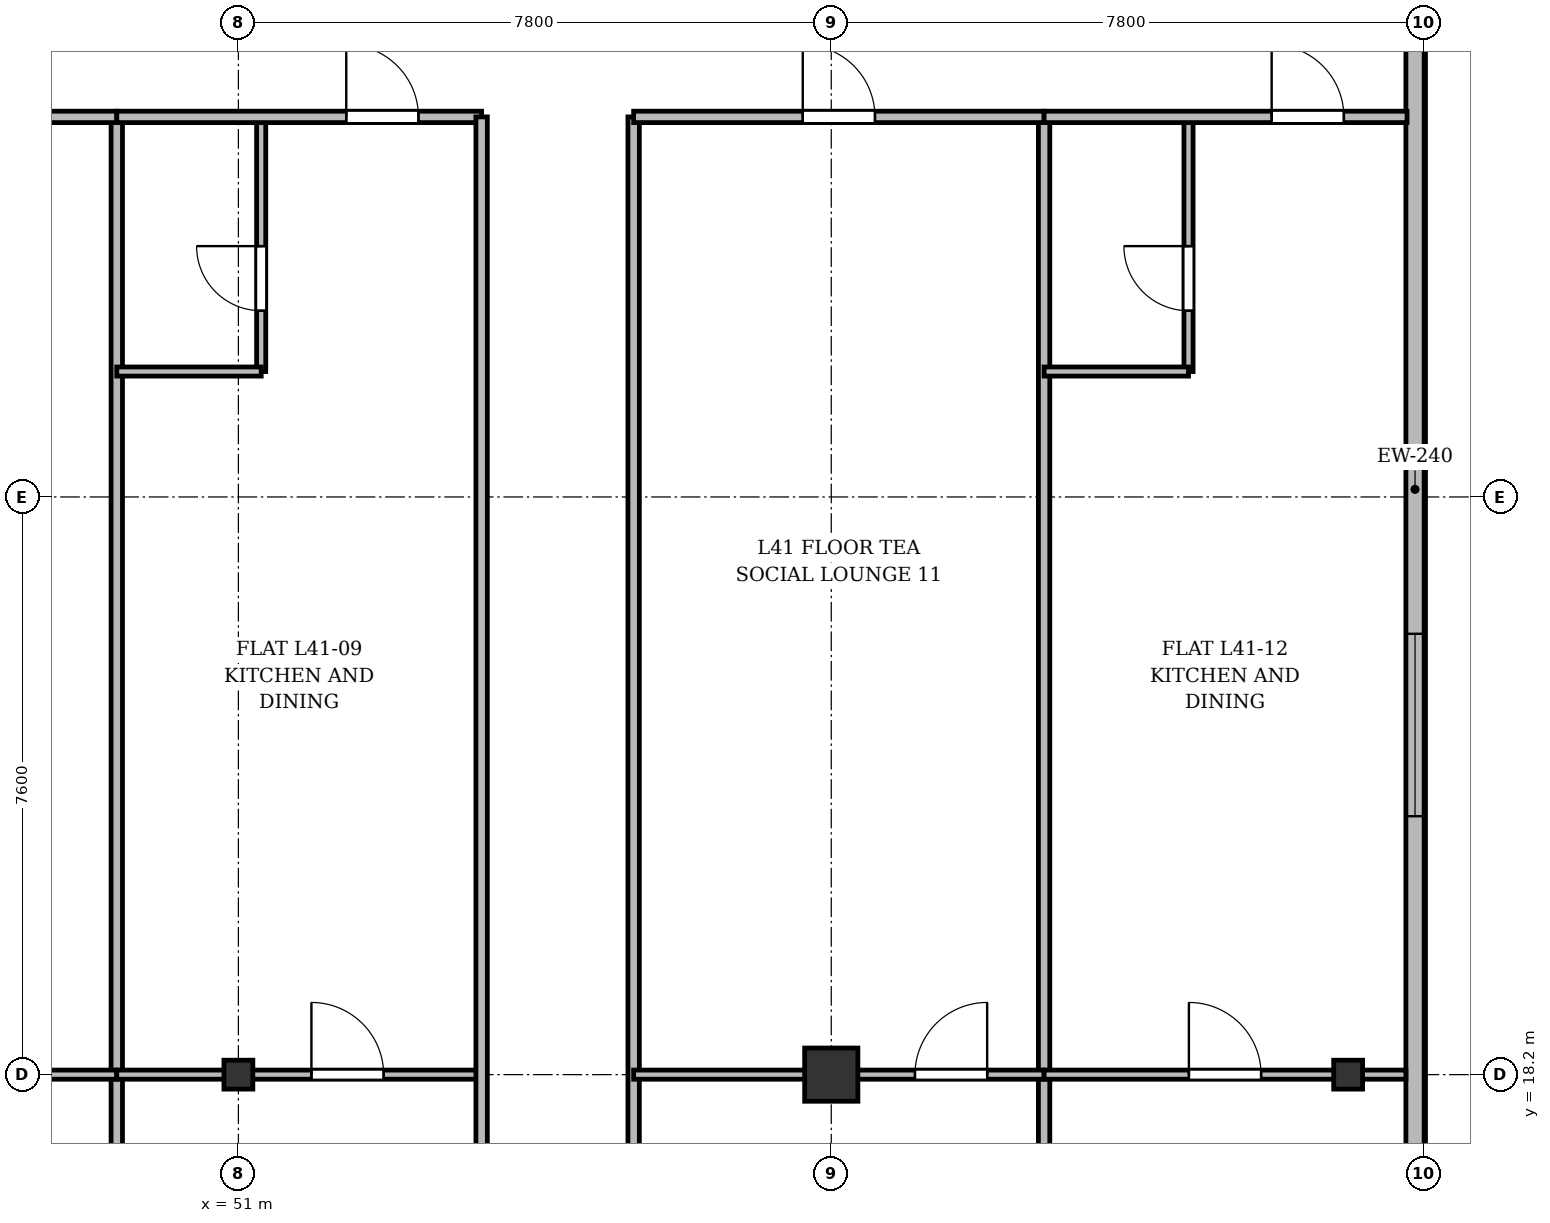
"""IFC4 building model, lengths in metres.
Left out: names, types, materials, properties, quantities, classifications, styles, units other than length and angle.
Written with IfcOpenShell. Run it as: python <this file> out.ifc"""

import sys

from ifc_helpers import new_model, si_unit, direction, frame, frame_2d, origin, origin_2d, place, context, subcontext, project, spatial, rectangle, i_section, extrude, source, transform, mapped, element, fill, save


model = new_model("IFC4")
c1 = context("Model", 3, precision=1e-05, world=origin(), true_north=direction((0.0, 1.0)))
c2 = subcontext(c1, "Body", "Model", "MODEL_VIEW")
j1 = project(units=[si_unit("LENGTHUNIT", "METRE"), si_unit("PLANEANGLEUNIT", "RADIAN")], contexts=[c1])
p1 = place(None, origin())
s1 = spatial("IfcSite", under=j1, at=p1, CompositionType="ELEMENT")
p2 = place(p1, origin())
s2 = spatial("IfcBuilding", under=s1, at=p2, CompositionType="ELEMENT")
p3 = place(p2, frame((0.0, 0.0, 157.3)))
s3 = spatial("IfcBuildingStorey", under=s2, at=p3, CompositionType="ELEMENT", Elevation=157.3)
m1 = source(origin(), c2, "Body", "SweptSolid", [
    extrude(i_section(OverallWidth=0.38, OverallDepth=0.38, WebThickness=0.02, FlangeThickness=0.03, at=origin_2d()), origin(), (0.0, 0.0, 1.0), 3.6),
])
p4 = place(p3, frame((51.0, 18.2, 0.0), z_axis=(0.0, 0.0, 1.0), x_axis=(1.0, 0.0, 0.0)))
e1 = element("IfcColumn", 1, at=p4, inside=s3, PredefinedType="COLUMN", context=c2, shape_type="MappedRepresentation", body=[
    mapped(m1, transform((0.0, 0.0, 0.0), x_axis=(1.0, 0.0, 0.0), y_axis=(0.0, 1.0, 0.0), z_axis=(0.0, 0.0, 1.0), scale=1.0)),
])
m2 = source(origin(), c2, "Body", "SweptSolid", [
    extrude(rectangle(XDim=0.7, YDim=0.7, at=origin_2d()), origin(), (0.0, 0.0, 1.0), 3.6),
])
p5 = place(p3, frame((58.8, 18.2, 0.0), z_axis=(0.0, 0.0, 1.0), x_axis=(1.0, 0.0, 0.0)))
e2 = element("IfcColumn", 2, at=p5, inside=s3, PredefinedType="COLUMN", context=c2, shape_type="MappedRepresentation", body=[
    mapped(m2, transform((0.0, 0.0, 0.0), x_axis=(1.0, 0.0, 0.0), y_axis=(0.0, 1.0, 0.0), z_axis=(0.0, 0.0, 1.0), scale=1.0)),
])
p6 = place(p3, frame((65.6, 18.2, 0.0), z_axis=(0.0, 0.0, 1.0), x_axis=(1.0, 0.0, 0.0)))
e3 = element("IfcColumn", 3, at=p6, inside=s3, PredefinedType="COLUMN", context=c2, shape_type="MappedRepresentation", body=[
    mapped(m1, transform((0.0, 0.0, 0.0), x_axis=(1.0, 0.0, 0.0), y_axis=(0.0, 1.0, 0.0), z_axis=(0.0, 0.0, 1.0), scale=1.0)),
])
p7 = place(p3, frame((66.48, 45.5, 0.0), z_axis=(0.0, 0.0, 1.0), x_axis=(0.0, -1.0, 0.0)))
e4 = element("IfcWall", 4, at=p7, inside=s3, PredefinedType="SOLIDWALL", context=c2, shape_type="SweptSolid", body=[
    extrude(rectangle(XDim=39.2, YDim=0.24, at=frame_2d((19.6, 0.0))), origin(), (0.0, 0.0, 1.0), 3.35),
])
p8 = place(p7, frame((36.55, 0.0, 0.92)))
e5 = element("IfcOpeningElement", 5, at=p8, cuts=e4, PredefinedType="OPENING", context=c2, shape_type="SweptSolid", body=[
    extrude(rectangle(XDim=1.2, YDim=1.65, at=frame_2d((0.6, 0.825))), frame((0.0, 0.13, 0.0), z_axis=(0.0, -1.0, 0.0), x_axis=(1.0, 0.0, 0.0)), (0.0, 0.0, 1.0), 0.26),
])
p9 = place(p7, frame((32.9, 0.0, 0.92)))
e6 = element("IfcOpeningElement", 6, at=p9, cuts=e4, PredefinedType="OPENING", context=c2, shape_type="SweptSolid", body=[
    extrude(rectangle(XDim=2.4, YDim=2.1, at=frame_2d((1.2, 1.05))), frame((0.0, 0.13, 0.0), z_axis=(0.0, -1.0, 0.0), x_axis=(1.0, 0.0, 0.0)), (0.0, 0.0, 1.0), 0.26),
])
p10 = place(p7, frame((28.7, 0.0, 0.92)))
e7 = element("IfcOpeningElement", 7, at=p10, cuts=e4, PredefinedType="OPENING", context=c2, shape_type="SweptSolid", body=[
    extrude(rectangle(XDim=2.4, YDim=2.1, at=frame_2d((1.2, 1.05))), frame((0.0, 0.13, 0.0), z_axis=(0.0, -1.0, 0.0), x_axis=(1.0, 0.0, 0.0)), (0.0, 0.0, 1.0), 0.26),
])
p11 = place(p7, frame((21.5, 0.0, 0.92)))
e8 = element("IfcOpeningElement", 8, at=p11, cuts=e4, PredefinedType="OPENING", context=c2, shape_type="SweptSolid", body=[
    extrude(rectangle(XDim=2.4, YDim=2.1, at=frame_2d((1.2, 1.05))), frame((0.0, 0.13, 0.0), z_axis=(0.0, -1.0, 0.0), x_axis=(1.0, 0.0, 0.0)), (0.0, 0.0, 1.0), 0.26),
])
p12 = place(p7, frame((7.5, 0.0, 0.92)))
e9 = element("IfcOpeningElement", 9, at=p12, cuts=e4, PredefinedType="OPENING", context=c2, shape_type="SweptSolid", body=[
    extrude(rectangle(XDim=2.4, YDim=2.1, at=frame_2d((1.2, 1.05))), frame((0.0, 0.13, 0.0), z_axis=(0.0, -1.0, 0.0), x_axis=(1.0, 0.0, 0.0)), (0.0, 0.0, 1.0), 0.26),
])
p13 = place(p7, frame((4.5, 0.0, 0.92)))
e10 = element("IfcOpeningElement", 10, at=p13, cuts=e4, PredefinedType="OPENING", context=c2, shape_type="SweptSolid", body=[
    extrude(rectangle(XDim=1.2, YDim=1.65, at=frame_2d((0.6, 0.825))), frame((0.0, 0.13, 0.0), z_axis=(0.0, -1.0, 0.0), x_axis=(1.0, 0.0, 0.0)), (0.0, 0.0, 1.0), 0.26),
])
p14 = place(p7, frame((1.15, 0.0, 0.92)))
e11 = element("IfcOpeningElement", 11, at=p14, cuts=e4, PredefinedType="OPENING", context=c2, shape_type="SweptSolid", body=[
    extrude(rectangle(XDim=1.2, YDim=1.65, at=frame_2d((0.6, 0.825))), frame((0.0, 0.13, 0.0), z_axis=(0.0, -1.0, 0.0), x_axis=(1.0, 0.0, 0.0)), (0.0, 0.0, 1.0), 0.26),
])
for number, where, z_axis, x_axis in (
    (12, (49.4, 3.525, 0.0), (0.0, 0.0, 1.0), (0.0, 1.0, 0.0)),
    (13, (61.6, 3.525, 0.0), (0.0, 0.0, 1.0), (0.0, 1.0, 0.0)),
):
    element("IfcWall", number, at=place(p3, frame(where, z_axis=z_axis, x_axis=x_axis)), inside=s3, PredefinedType="PARTITIONING", context=c2, shape_type="SweptSolid", body=[
        extrude(rectangle(XDim=27.275, YDim=0.15, at=frame_2d((13.638, 0.0))), origin(), (0.0, 0.0, 1.0), 2.75),
    ])
p15 = place(p3, frame((43.8, 30.8, 0.0), z_axis=(0.0, 0.0, 1.0), x_axis=(1.0, 0.0, 0.0)))
e14 = element("IfcWall", 14, at=p15, inside=s3, PredefinedType="PARTITIONING", context=c2, shape_type="SweptSolid", body=[
    extrude(rectangle(XDim=5.6, YDim=0.15, at=frame_2d((2.8, 0.0))), origin(), (0.0, 0.0, 1.0), 2.85),
])
p16 = place(p15, frame((2.418, 0.0, 0.0)))
e15 = element("IfcOpeningElement", 15, at=p16, cuts=e14, PredefinedType="OPENING", context=c2, shape_type="SweptSolid", body=[
    extrude(rectangle(XDim=0.95, YDim=2.15, at=frame_2d((0.475, 1.075))), frame((0.0, 0.085, 0.0), z_axis=(0.0, -1.0, 0.0), x_axis=(1.0, 0.0, 0.0)), (0.0, 0.0, 1.0), 0.17),
])
p17 = place(p3, frame((43.8, 18.2, 0.0), z_axis=(0.0, 0.0, 1.0), x_axis=(1.0, 0.0, 0.0)))
e16 = element("IfcWall", 16, at=p17, inside=s3, PredefinedType="PARTITIONING", context=c2, shape_type="SweptSolid", body=[
    extrude(rectangle(XDim=5.6, YDim=0.12, at=frame_2d((2.8, 0.0))), origin(), (0.0, 0.0, 1.0), 2.75),
])
p18 = place(p17, frame((2.418, 0.0, 0.0)))
e17 = element("IfcOpeningElement", 17, at=p18, cuts=e16, PredefinedType="OPENING", context=c2, shape_type="SweptSolid", body=[
    extrude(rectangle(XDim=0.95, YDim=2.15, at=frame_2d((0.475, 1.075))), frame((0.0, 0.07, 0.0), z_axis=(0.0, -1.0, 0.0), x_axis=(1.0, 0.0, 0.0)), (0.0, 0.0, 1.0), 0.14),
])
p19 = place(p3, frame((49.4, 18.2, 0.0), z_axis=(0.0, 0.0, 1.0), x_axis=(1.0, 0.0, 0.0)))
e18 = element("IfcWall", 18, at=p19, inside=s3, PredefinedType="PARTITIONING", context=c2, shape_type="SweptSolid", body=[
    extrude(rectangle(XDim=4.8, YDim=0.12, at=frame_2d((2.4, 0.0))), origin(), (0.0, 0.0, 1.0), 2.75),
])
p20 = place(p19, frame((2.561, 0.0, 0.0)))
e19 = element("IfcOpeningElement", 19, at=p20, cuts=e18, PredefinedType="OPENING", context=c2, shape_type="SweptSolid", body=[
    extrude(rectangle(XDim=0.95, YDim=2.15, at=frame_2d((0.475, 1.075))), frame((0.0, 0.07, 0.0), z_axis=(0.0, -1.0, 0.0), x_axis=(1.0, 0.0, 0.0)), (0.0, 0.0, 1.0), 0.14),
])
p21 = place(p3, frame((51.3, 27.45, 0.0), z_axis=(0.0, 0.0, 1.0), x_axis=(0.0, 1.0, 0.0)))
e20 = element("IfcWall", 20, at=p21, inside=s3, PredefinedType="PARTITIONING", context=c2, shape_type="SweptSolid", body=[
    extrude(rectangle(XDim=3.35, YDim=0.12, at=frame_2d((1.675, 0.0))), origin(), (0.0, 0.0, 1.0), 3.35),
])
p22 = place(p21, frame((0.8, 0.0, 0.0)))
e21 = element("IfcOpeningElement", 21, at=p22, cuts=e20, PredefinedType="OPENING", context=c2, shape_type="SweptSolid", body=[
    extrude(rectangle(XDim=0.85, YDim=2.1, at=frame_2d((0.425, 1.05))), frame((0.0, 0.07, 0.0), z_axis=(0.0, -1.0, 0.0), x_axis=(1.0, 0.0, 0.0)), (0.0, 0.0, 1.0), 0.14),
])
p23 = place(p3, frame((49.4, 27.45, 0.0), z_axis=(0.0, 0.0, 1.0), x_axis=(1.0, 0.0, 0.0)))
e22 = element("IfcWall", 22, at=p23, inside=s3, PredefinedType="PARTITIONING", context=c2, shape_type="SweptSolid", body=[
    extrude(rectangle(XDim=1.9, YDim=0.12, at=frame_2d((0.95, 0.0))), origin(), (0.0, 0.0, 1.0), 2.85),
])
p24 = place(p3, frame((49.4, 30.8, 0.0), z_axis=(0.0, 0.0, 1.0), x_axis=(1.0, 0.0, 0.0)))
e23 = element("IfcWall", 23, at=p24, inside=s3, PredefinedType="PARTITIONING", context=c2, shape_type="SweptSolid", body=[
    extrude(rectangle(XDim=4.8, YDim=0.15, at=frame_2d((2.4, 0.0))), origin(), (0.0, 0.0, 1.0), 2.85),
])
p25 = place(p24, frame((3.019, 0.0, 0.0)))
e24 = element("IfcOpeningElement", 24, at=p25, cuts=e23, PredefinedType="OPENING", context=c2, shape_type="SweptSolid", body=[
    extrude(rectangle(XDim=0.95, YDim=2.15, at=frame_2d((0.475, 1.075))), frame((0.0, 0.085, 0.0), z_axis=(0.0, -1.0, 0.0), x_axis=(1.0, 0.0, 0.0)), (0.0, 0.0, 1.0), 0.17),
])
for number, where, z_axis, x_axis in (
    (25, (54.2, 3.525, 0.0), (0.0, 0.0, 1.0), (0.0, 1.0, 0.0)),
    (26, (56.2, 3.525, 0.0), (0.0, 0.0, 1.0), (0.0, 1.0, 0.0)),
):
    element("IfcWall", number, at=place(p3, frame(where, z_axis=z_axis, x_axis=x_axis)), inside=s3, PredefinedType="PARTITIONING", context=c2, shape_type="SweptSolid", body=[
        extrude(rectangle(XDim=27.275, YDim=0.15, at=frame_2d((13.638, 0.0))), origin(), (0.0, 0.0, 1.0), 2.75),
    ])
p26 = place(p3, frame((56.2, 30.8, 0.0), z_axis=(0.0, 0.0, 1.0), x_axis=(1.0, 0.0, 0.0)))
e27 = element("IfcWall", 27, at=p26, inside=s3, PredefinedType="PARTITIONING", context=c2, shape_type="SweptSolid", body=[
    extrude(rectangle(XDim=5.4, YDim=0.15, at=frame_2d((2.7, 0.0))), origin(), (0.0, 0.0, 1.0), 2.85),
])
p27 = place(p26, frame((2.225, 0.0, 0.0)))
e28 = element("IfcOpeningElement", 28, at=p27, cuts=e27, PredefinedType="OPENING", context=c2, shape_type="SweptSolid", body=[
    extrude(rectangle(XDim=0.95, YDim=2.15, at=frame_2d((0.475, 1.075))), frame((0.0, 0.085, 0.0), z_axis=(0.0, -1.0, 0.0), x_axis=(1.0, 0.0, 0.0)), (0.0, 0.0, 1.0), 0.17),
])
p28 = place(p3, frame((56.2, 18.2, 0.0), z_axis=(0.0, 0.0, 1.0), x_axis=(1.0, 0.0, 0.0)))
e29 = element("IfcWall", 29, at=p28, inside=s3, PredefinedType="PARTITIONING", context=c2, shape_type="SweptSolid", body=[
    extrude(rectangle(XDim=5.4, YDim=0.12, at=frame_2d((2.7, 0.0))), origin(), (0.0, 0.0, 1.0), 2.75),
])
p29 = place(p28, frame((3.701, 0.0, 0.0)))
e30 = element("IfcOpeningElement", 30, at=p29, cuts=e29, PredefinedType="OPENING", context=c2, shape_type="SweptSolid", body=[
    extrude(rectangle(XDim=0.95, YDim=2.15, at=frame_2d((0.475, 1.075))), frame((0.0, 0.07, 0.0), z_axis=(0.0, -1.0, 0.0), x_axis=(1.0, 0.0, 0.0)), (0.0, 0.0, 1.0), 0.14),
])
p30 = place(p3, frame((61.6, 18.2, 0.0), z_axis=(0.0, 0.0, 1.0), x_axis=(1.0, 0.0, 0.0)))
e31 = element("IfcWall", 31, at=p30, inside=s3, PredefinedType="PARTITIONING", context=c2, shape_type="SweptSolid", body=[
    extrude(rectangle(XDim=4.76, YDim=0.12, at=frame_2d((2.38, 0.0))), origin(), (0.0, 0.0, 1.0), 2.75),
])
p31 = place(p30, frame((1.905, 0.0, 0.0)))
e32 = element("IfcOpeningElement", 32, at=p31, cuts=e31, PredefinedType="OPENING", context=c2, shape_type="SweptSolid", body=[
    extrude(rectangle(XDim=0.95, YDim=2.15, at=frame_2d((0.475, 1.075))), frame((0.0, 0.07, 0.0), z_axis=(0.0, -1.0, 0.0), x_axis=(1.0, 0.0, 0.0)), (0.0, 0.0, 1.0), 0.14),
])
p32 = place(p3, frame((63.5, 27.45, 0.0), z_axis=(0.0, 0.0, 1.0), x_axis=(0.0, 1.0, 0.0)))
e33 = element("IfcWall", 33, at=p32, inside=s3, PredefinedType="PARTITIONING", context=c2, shape_type="SweptSolid", body=[
    extrude(rectangle(XDim=3.35, YDim=0.12, at=frame_2d((1.675, 0.0))), origin(), (0.0, 0.0, 1.0), 3.35),
])
p33 = place(p32, frame((0.8, 0.0, 0.0)))
e34 = element("IfcOpeningElement", 34, at=p33, cuts=e33, PredefinedType="OPENING", context=c2, shape_type="SweptSolid", body=[
    extrude(rectangle(XDim=0.85, YDim=2.1, at=frame_2d((0.425, 1.05))), frame((0.0, 0.07, 0.0), z_axis=(0.0, -1.0, 0.0), x_axis=(1.0, 0.0, 0.0)), (0.0, 0.0, 1.0), 0.14),
])
p34 = place(p3, frame((61.6, 27.45, 0.0), z_axis=(0.0, 0.0, 1.0), x_axis=(1.0, 0.0, 0.0)))
e35 = element("IfcWall", 35, at=p34, inside=s3, PredefinedType="PARTITIONING", context=c2, shape_type="SweptSolid", body=[
    extrude(rectangle(XDim=1.9, YDim=0.12, at=frame_2d((0.95, 0.0))), origin(), (0.0, 0.0, 1.0), 3.35),
])
p35 = place(p3, frame((61.6, 30.8, 0.0), z_axis=(0.0, 0.0, 1.0), x_axis=(1.0, 0.0, 0.0)))
e36 = element("IfcWall", 36, at=p35, inside=s3, PredefinedType="PARTITIONING", context=c2, shape_type="SweptSolid", body=[
    extrude(rectangle(XDim=4.775, YDim=0.15, at=frame_2d((2.387, 0.0))), origin(), (0.0, 0.0, 1.0), 2.85),
])
p36 = place(p35, frame((2.994, 0.0, 0.0)))
e37 = element("IfcOpeningElement", 37, at=p36, cuts=e36, PredefinedType="OPENING", context=c2, shape_type="SweptSolid", body=[
    extrude(rectangle(XDim=0.95, YDim=2.15, at=frame_2d((0.475, 1.075))), frame((0.0, 0.085, 0.0), z_axis=(0.0, -1.0, 0.0), x_axis=(1.0, 0.0, 0.0)), (0.0, 0.0, 1.0), 0.17),
])
m3 = source(origin(), c2, "Body", "SweptSolid", [
    extrude(rectangle(XDim=2.4, YDim=2.1, at=frame_2d((1.2, 1.05))), frame((0.0, 0.03, 0.0), z_axis=(0.0, -1.0, 0.0), x_axis=(1.0, 0.0, 0.0)), (0.0, 0.0, 1.0), 0.06),
])
p37 = place(p11, origin())
e38 = element("IfcWindow", 38, at=p37, inside=s3, PartitioningType="SINGLE_PANEL", PredefinedType="WINDOW", context=c2, shape_type="MappedRepresentation", body=[
    mapped(m3, transform((0.0, 0.0, 0.0), x_axis=(1.0, 0.0, 0.0), y_axis=(0.0, 1.0, 0.0), z_axis=(0.0, 0.0, 1.0), scale=1.0)),
])
fill(e8, e38)
m4 = source(origin(), c2, "Body", "SweptSolid", [
    extrude(rectangle(XDim=0.95, YDim=2.15, at=frame_2d((0.475, 1.075))), frame((0.0, 0.025, 0.0), z_axis=(0.0, -1.0, 0.0), x_axis=(1.0, 0.0, 0.0)), (0.0, 0.0, 1.0), 0.05),
])
p38 = place(p20, origin())
e39 = element("IfcDoor", 39, at=p38, inside=s3, OperationType="SINGLE_SWING_LEFT", PredefinedType="DOOR", context=c2, shape_type="MappedRepresentation", body=[
    mapped(m4, transform((0.0, 0.0, 0.0), x_axis=(1.0, 0.0, 0.0), y_axis=(0.0, 1.0, 0.0), z_axis=(0.0, 0.0, 1.0), scale=1.0)),
])
fill(e19, e39)
m5 = source(origin(), c2, "Body", "SweptSolid", [
    extrude(rectangle(XDim=0.85, YDim=2.1, at=frame_2d((0.425, 1.05))), frame((0.0, 0.025, 0.0), z_axis=(0.0, -1.0, 0.0), x_axis=(1.0, 0.0, 0.0)), (0.0, 0.0, 1.0), 0.05),
])
p39 = place(p22, origin())
e40 = element("IfcDoor", 40, at=p39, inside=s3, OperationType="SINGLE_SWING_RIGHT", PredefinedType="DOOR", context=c2, shape_type="MappedRepresentation", body=[
    mapped(m5, transform((0.0, 0.0, 0.0), x_axis=(1.0, 0.0, 0.0), y_axis=(0.0, 1.0, 0.0), z_axis=(0.0, 0.0, 1.0), scale=1.0)),
])
fill(e21, e40)
p40 = place(p25, origin())
e41 = element("IfcDoor", 41, at=p40, inside=s3, OperationType="SINGLE_SWING_LEFT", PredefinedType="DOOR", context=c2, shape_type="MappedRepresentation", body=[
    mapped(m4, transform((0.0, 0.0, 0.0), x_axis=(1.0, 0.0, 0.0), y_axis=(0.0, 1.0, 0.0), z_axis=(0.0, 0.0, 1.0), scale=1.0)),
])
fill(e24, e41)
p41 = place(p27, origin())
e42 = element("IfcDoor", 42, at=p41, inside=s3, OperationType="SINGLE_SWING_LEFT", PredefinedType="DOOR", context=c2, shape_type="MappedRepresentation", body=[
    mapped(m4, transform((0.0, 0.0, 0.0), x_axis=(1.0, 0.0, 0.0), y_axis=(0.0, 1.0, 0.0), z_axis=(0.0, 0.0, 1.0), scale=1.0)),
])
fill(e28, e42)
p42 = place(p29, origin())
e43 = element("IfcDoor", 43, at=p42, inside=s3, OperationType="SINGLE_SWING_RIGHT", PredefinedType="DOOR", context=c2, shape_type="MappedRepresentation", body=[
    mapped(m4, transform((0.0, 0.0, 0.0), x_axis=(1.0, 0.0, 0.0), y_axis=(0.0, 1.0, 0.0), z_axis=(0.0, 0.0, 1.0), scale=1.0)),
])
fill(e30, e43)
p43 = place(p31, origin())
e44 = element("IfcDoor", 44, at=p43, inside=s3, OperationType="SINGLE_SWING_LEFT", PredefinedType="DOOR", context=c2, shape_type="MappedRepresentation", body=[
    mapped(m4, transform((0.0, 0.0, 0.0), x_axis=(1.0, 0.0, 0.0), y_axis=(0.0, 1.0, 0.0), z_axis=(0.0, 0.0, 1.0), scale=1.0)),
])
fill(e32, e44)
p44 = place(p33, origin())
e45 = element("IfcDoor", 45, at=p44, inside=s3, OperationType="SINGLE_SWING_RIGHT", PredefinedType="DOOR", context=c2, shape_type="MappedRepresentation", body=[
    mapped(m5, transform((0.0, 0.0, 0.0), x_axis=(1.0, 0.0, 0.0), y_axis=(0.0, 1.0, 0.0), z_axis=(0.0, 0.0, 1.0), scale=1.0)),
])
fill(e34, e45)
p45 = place(p36, origin())
e46 = element("IfcDoor", 46, at=p45, inside=s3, OperationType="SINGLE_SWING_LEFT", PredefinedType="DOOR", context=c2, shape_type="MappedRepresentation", body=[
    mapped(m4, transform((0.0, 0.0, 0.0), x_axis=(1.0, 0.0, 0.0), y_axis=(0.0, 1.0, 0.0), z_axis=(0.0, 0.0, 1.0), scale=1.0)),
])
fill(e37, e46)
save(model, sys.argv[1])
